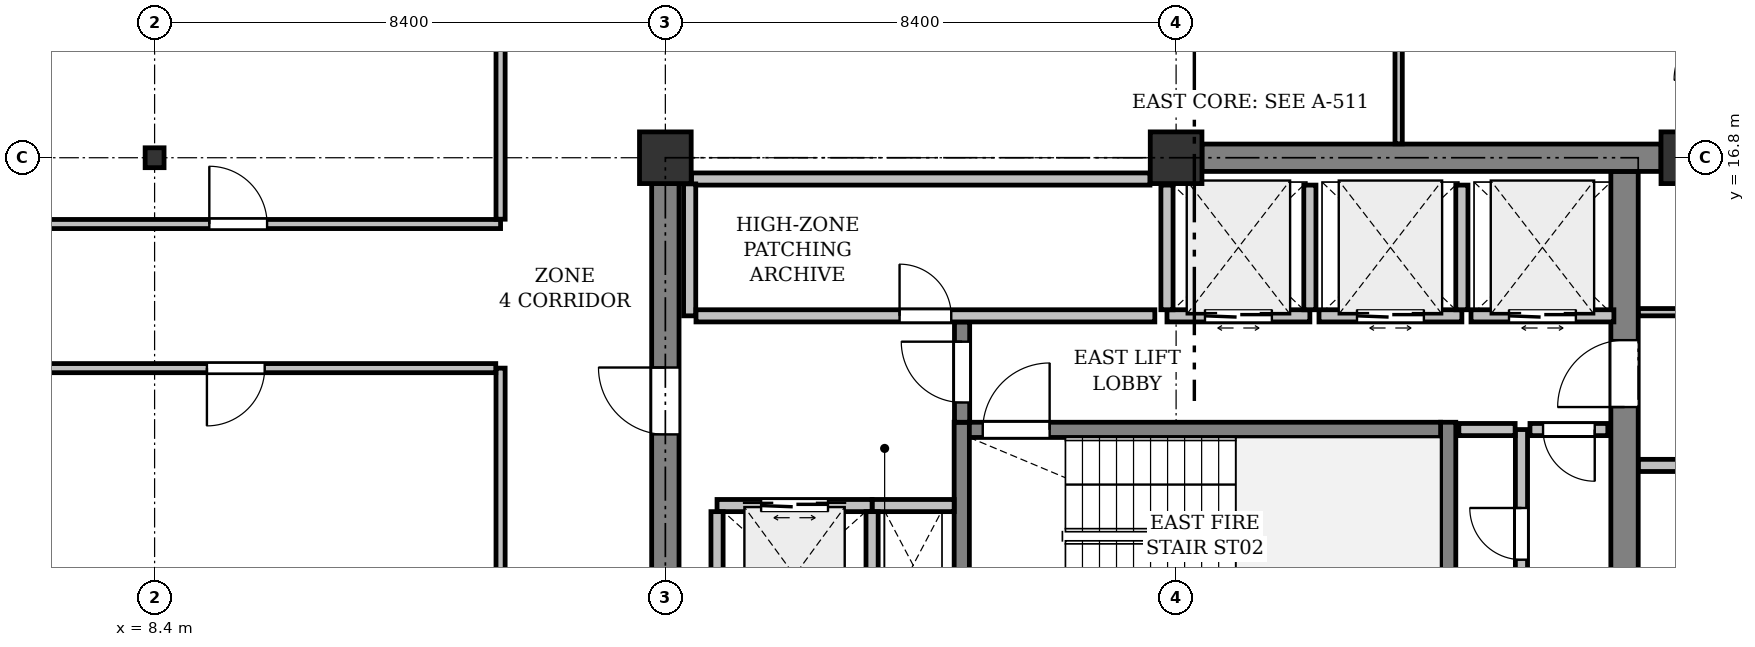
"""IFC4 building model, lengths in metres.
Left out: names, types, materials, properties, quantities, classifications, styles, units other than length and angle.
Written with IfcOpenShell. Run it as: python <this file> out.ifc"""

import sys

from ifc_helpers import new_model, si_unit, direction, frame, frame_2d, origin, origin_2d, place, context, subcontext, project, spatial, rectangle, i_section, extrude, element, fill, save


model = new_model("IFC4")
c1 = context("Model", 3, precision=1e-05, world=origin(), true_north=direction((0.0, 1.0)))
c2 = subcontext(c1, "Body", "Model", "MODEL_VIEW")
j1 = project(units=[si_unit("LENGTHUNIT", "METRE"), si_unit("PLANEANGLEUNIT", "RADIAN")], contexts=[c1])
p1 = place(None, origin())
s1 = spatial("IfcSite", under=j1, at=p1, CompositionType="ELEMENT")
p2 = place(p1, origin())
s2 = spatial("IfcBuilding", under=s1, at=p2, CompositionType="ELEMENT")
p3 = place(p2, frame((0.0, 0.0, 245.2)))
s3 = spatial("IfcBuildingStorey", under=s2, at=p3, CompositionType="ELEMENT", Elevation=245.2)
p4 = place(p3, frame((8.4, 16.8, 0.0), z_axis=(0.0, 0.0, 1.0), x_axis=(1.0, 0.0, 0.0)))
e1 = element("IfcColumn", 1, at=p4, inside=s3, PredefinedType="COLUMN", context=c2, shape_type="SweptSolid", body=[
    extrude(i_section(OverallWidth=0.35, OverallDepth=0.35, WebThickness=0.02, FlangeThickness=0.032, at=origin_2d()), origin(), (0.0, 0.0, 1.0), 5.0),
])
for number, where, z_axis, x_axis in (
    (2, (16.8, 16.8, 0.0), (0.0, 0.0, 1.0), (1.0, 0.0, 0.0)),
    (3, (25.2, 16.8, 0.0), (0.0, 0.0, 1.0), (1.0, 0.0, 0.0)),
    (4, (33.6, 16.8, 0.0), (0.0, 0.0, 1.0), (1.0, 0.0, 0.0)),
):
    element("IfcColumn", number, at=place(p3, frame(where, z_axis=z_axis, x_axis=x_axis)), inside=s3, PredefinedType="COLUMN", context=c2, shape_type="SweptSolid", body=[
        extrude(rectangle(XDim=1.0, YDim=1.0, at=origin_2d()), origin(), (0.0, 0.0, 1.0), 5.0),
    ])
p5 = place(p3, frame((32.575, 8.625, 0.0), z_axis=(0.0, 0.0, 1.0), x_axis=(0.0, 1.0, 0.0)))
e5 = element("IfcWall", 5, at=p5, inside=s3, PredefinedType="SHEAR", context=c2, shape_type="SweptSolid", body=[
    extrude(rectangle(XDim=7.95, YDim=0.45, at=frame_2d((3.975, 0.0))), origin(), (0.0, 0.0, 1.0), 4.725),
])
p6 = place(p5, frame((4.075, 0.0, 0.0)))
e6 = element("IfcOpeningElement", 6, at=p6, cuts=e5, PredefinedType="OPENING", context=c2, shape_type="SweptSolid", body=[
    extrude(rectangle(XDim=1.1, YDim=2.15, at=frame_2d((0.55, 1.075))), frame((0.0, 0.235, 0.0), z_axis=(0.0, -1.0, 0.0), x_axis=(1.0, 0.0, 0.0)), (0.0, 0.0, 1.0), 0.47),
])
p7 = place(p3, frame((16.8, 8.9, 0.0), z_axis=(0.0, 0.0, 1.0), x_axis=(0.0, 1.0, 0.0)))
e7 = element("IfcWall", 7, at=p7, inside=s3, PredefinedType="SHEAR", context=c2, shape_type="SweptSolid", body=[
    extrude(rectangle(XDim=7.4, YDim=0.45, at=frame_2d((3.7, 0.0))), origin(), (0.0, 0.0, 1.0), 4.725),
])
p8 = place(p7, frame((3.35, 0.0, 0.0)))
e8 = element("IfcOpeningElement", 8, at=p8, cuts=e7, PredefinedType="OPENING", context=c2, shape_type="SweptSolid", body=[
    extrude(rectangle(XDim=1.1, YDim=2.15, at=frame_2d((0.55, 1.075))), frame((0.0, 0.235, 0.0), z_axis=(0.0, -1.0, 0.0), x_axis=(1.0, 0.0, 0.0)), (0.0, 0.0, 1.0), 0.47),
])
p9 = place(p3, frame((25.7, 16.8, 0.0), z_axis=(0.0, 0.0, 1.0), x_axis=(1.0, 0.0, 0.0)))
e9 = element("IfcWall", 9, at=p9, inside=s3, PredefinedType="SHEAR", context=c2, shape_type="SweptSolid", body=[
    extrude(rectangle(XDim=7.4, YDim=0.45, at=frame_2d((3.7, 0.0))), origin(), (0.0, 0.0, 1.0), 4.725),
])
for number, where, z_axis, x_axis in (
    (10, (21.675, 8.7, 0.0), (0.0, 0.0, 1.0), (0.0, 1.0, 0.0)),
    (11, (29.675, 8.7, 0.0), (0.0, 0.0, 1.0), (0.0, 1.0, 0.0)),
):
    element("IfcWall", number, at=place(p3, frame(where, z_axis=z_axis, x_axis=x_axis)), inside=s3, PredefinedType="SHEAR", context=c2, shape_type="SweptSolid", body=[
        extrude(rectangle(XDim=3.75, YDim=0.25, at=frame_2d((1.875, 0.0))), origin(), (0.0, 0.0, 1.0), 4.725),
    ])
p10 = place(p3, frame((21.8, 12.325, 0.0), z_axis=(0.0, 0.0, 1.0), x_axis=(1.0, 0.0, 0.0)))
e12 = element("IfcWall", 12, at=p10, inside=s3, PredefinedType="SHEAR", context=c2, shape_type="SweptSolid", body=[
    extrude(rectangle(XDim=7.75, YDim=0.25, at=frame_2d((3.875, 0.0))), origin(), (0.0, 0.0, 1.0), 4.725),
])
p11 = place(p10, frame((0.22, 0.0, 0.0)))
e13 = element("IfcOpeningElement", 13, at=p11, cuts=e12, PredefinedType="OPENING", context=c2, shape_type="SweptSolid", body=[
    extrude(rectangle(XDim=1.1, YDim=2.15, at=frame_2d((0.55, 1.075))), frame((0.0, 0.135, 0.0), z_axis=(0.0, -1.0, 0.0), x_axis=(1.0, 0.0, 0.0)), (0.0, 0.0, 1.0), 0.27),
])
p12 = place(p3, frame((20.2, 11.08, 0.0), z_axis=(0.0, 0.0, 1.0), x_axis=(1.0, 0.0, 0.0)))
e14 = element("IfcWall", 14, at=p12, inside=s3, PredefinedType="PARTITIONING", context=c2, shape_type="SweptSolid", body=[
    extrude(rectangle(XDim=1.35, YDim=0.2, at=frame_2d((0.675, 0.0))), origin(), (0.0, 0.0, 1.0), 4.725),
])
p13 = place(p3, frame((21.68, 12.45, 0.0), z_axis=(0.0, 0.0, 1.0), x_axis=(0.0, 1.0, 0.0)))
e15 = element("IfcWall", 15, at=p13, inside=s3, PredefinedType="SHEAR", context=c2, shape_type="SweptSolid", body=[
    extrude(rectangle(XDim=1.65, YDim=0.25, at=frame_2d((0.825, 0.0))), origin(), (0.0, 0.0, 1.0), 4.725),
])
p14 = place(p13, frame((0.325, 0.0, 0.0)))
e16 = element("IfcOpeningElement", 16, at=p14, cuts=e15, PredefinedType="OPENING", context=c2, shape_type="SweptSolid", body=[
    extrude(rectangle(XDim=1.0, YDim=2.15, at=frame_2d((0.5, 1.075))), frame((0.0, 0.135, 0.0), z_axis=(0.0, -1.0, 0.0), x_axis=(1.0, 0.0, 0.0)), (0.0, 0.0, 1.0), 0.27),
])
p15 = place(p3, frame((17.65, 11.08, 0.0), z_axis=(0.0, 0.0, 1.0), x_axis=(1.0, 0.0, 0.0)))
e17 = element("IfcWall", 17, at=p15, inside=s3, PredefinedType="PARTITIONING", context=c2, shape_type="SweptSolid", body=[
    extrude(rectangle(XDim=2.55, YDim=0.2, at=frame_2d((1.275, 0.0))), origin(), (0.0, 0.0, 1.0), 4.725),
])
p16 = place(p15, frame((0.725, 0.0, 0.0)))
e18 = element("IfcOpeningElement", 18, at=p16, cuts=e17, PredefinedType="OPENING", context=c2, shape_type="SweptSolid", body=[
    extrude(rectangle(XDim=1.1, YDim=2.2, at=frame_2d((0.55, 1.1))), frame((0.0, 0.11, 0.0), z_axis=(0.0, -1.0, 0.0), x_axis=(1.0, 0.0, 0.0)), (0.0, 0.0, 1.0), 0.22),
])
for number, where, z_axis, x_axis in (
    (19, (20.2, 8.88, 0.0), (0.0, 0.0, 1.0), (0.0, 1.0, 0.0)),
    (20, (17.65, 8.88, 0.0), (0.0, 0.0, 1.0), (0.0, 1.0, 0.0)),
):
    element("IfcWall", number, at=place(p3, frame(where, z_axis=z_axis, x_axis=x_axis)), inside=s3, PredefinedType="PARTITIONING", context=c2, shape_type="SweptSolid", body=[
        extrude(rectangle(XDim=2.1, YDim=0.2, at=frame_2d((1.05, 0.0))), origin(), (0.0, 0.0, 1.0), 4.725),
    ])
p17 = place(p3, frame((25.05, 14.2, 0.0), z_axis=(0.0, 0.0, 1.0), x_axis=(1.0, 0.0, 0.0)))
e21 = element("IfcWall", 21, at=p17, inside=s3, PredefinedType="PARTITIONING", context=c2, shape_type="SweptSolid", body=[
    extrude(rectangle(XDim=2.35, YDim=0.2, at=frame_2d((1.175, 0.0))), origin(), (0.0, 0.0, 1.0), 4.725),
])
p18 = place(p17, frame((0.625, 0.0, 0.0)))
e22 = element("IfcOpeningElement", 22, at=p18, cuts=e21, PredefinedType="OPENING", context=c2, shape_type="SweptSolid", body=[
    extrude(rectangle(XDim=1.1, YDim=2.2, at=frame_2d((0.55, 1.1))), frame((0.0, 0.11, 0.0), z_axis=(0.0, -1.0, 0.0), x_axis=(1.0, 0.0, 0.0)), (0.0, 0.0, 1.0), 0.22),
])
for number, where, z_axis, x_axis in (
    (23, (27.4, 14.3, 0.0), (0.0, 0.0, 1.0), (0.0, 1.0, 0.0)),
    (24, (25.05, 14.3, 0.0), (0.0, 0.0, 1.0), (0.0, 1.0, 0.0)),
):
    element("IfcWall", number, at=place(p3, frame(where, z_axis=z_axis, x_axis=x_axis)), inside=s3, PredefinedType="PARTITIONING", context=c2, shape_type="SweptSolid", body=[
        extrude(rectangle(XDim=2.05, YDim=0.2, at=frame_2d((1.025, 0.0))), origin(), (0.0, 0.0, 1.0), 4.725),
    ])
p19 = place(p3, frame((27.55, 14.2, 0.0), z_axis=(0.0, 0.0, 1.0), x_axis=(1.0, 0.0, 0.0)))
e25 = element("IfcWall", 25, at=p19, inside=s3, PredefinedType="PARTITIONING", context=c2, shape_type="SweptSolid", body=[
    extrude(rectangle(XDim=2.35, YDim=0.2, at=frame_2d((1.175, 0.0))), origin(), (0.0, 0.0, 1.0), 4.725),
])
p20 = place(p19, frame((0.625, 0.0, 0.0)))
e26 = element("IfcOpeningElement", 26, at=p20, cuts=e25, PredefinedType="OPENING", context=c2, shape_type="SweptSolid", body=[
    extrude(rectangle(XDim=1.1, YDim=2.2, at=frame_2d((0.55, 1.1))), frame((0.0, 0.11, 0.0), z_axis=(0.0, -1.0, 0.0), x_axis=(1.0, 0.0, 0.0)), (0.0, 0.0, 1.0), 0.22),
])
p21 = place(p3, frame((29.9, 14.3, 0.0), z_axis=(0.0, 0.0, 1.0), x_axis=(0.0, 1.0, 0.0)))
e27 = element("IfcWall", 27, at=p21, inside=s3, PredefinedType="PARTITIONING", context=c2, shape_type="SweptSolid", body=[
    extrude(rectangle(XDim=2.05, YDim=0.2, at=frame_2d((1.025, 0.0))), origin(), (0.0, 0.0, 1.0), 4.725),
])
p22 = place(p3, frame((30.05, 14.2, 0.0), z_axis=(0.0, 0.0, 1.0), x_axis=(1.0, 0.0, 0.0)))
e28 = element("IfcWall", 28, at=p22, inside=s3, PredefinedType="PARTITIONING", context=c2, shape_type="SweptSolid", body=[
    extrude(rectangle(XDim=2.35, YDim=0.2, at=frame_2d((1.175, 0.0))), origin(), (0.0, 0.0, 1.0), 4.725),
])
p23 = place(p22, frame((0.625, 0.0, 0.0)))
e29 = element("IfcOpeningElement", 29, at=p23, cuts=e28, PredefinedType="OPENING", context=c2, shape_type="SweptSolid", body=[
    extrude(rectangle(XDim=1.1, YDim=2.2, at=frame_2d((0.55, 1.1))), frame((0.0, 0.11, 0.0), z_axis=(0.0, -1.0, 0.0), x_axis=(1.0, 0.0, 0.0)), (0.0, 0.0, 1.0), 0.22),
])
p24 = place(p3, frame((24.695, 16.45, 0.0), z_axis=(0.0, 0.0, 1.0), x_axis=(-1.0, 0.0, 0.0)))
e30 = element("IfcWall", 30, at=p24, inside=s3, PredefinedType="PARTITIONING", context=c2, shape_type="SweptSolid", body=[
    extrude(rectangle(XDim=7.39, YDim=0.2, at=frame_2d((3.695, 0.0))), origin(), (0.0, 0.0, 1.0), 4.725),
])
p25 = place(p3, frame((17.2, 16.295, 0.0), z_axis=(0.0, 0.0, 1.0), x_axis=(0.0, -1.0, 0.0)))
e31 = element("IfcWall", 31, at=p25, inside=s3, PredefinedType="PARTITIONING", context=c2, shape_type="SweptSolid", body=[
    extrude(rectangle(XDim=2.095, YDim=0.2, at=frame_2d((1.047, 0.0))), origin(), (0.0, 0.0, 1.0), 4.725),
])
p26 = place(p3, frame((17.304, 14.2, 0.0), z_axis=(0.0, 0.0, 1.0), x_axis=(1.0, 0.0, 0.0)))
e32 = element("IfcWall", 32, at=p26, inside=s3, PredefinedType="PARTITIONING", context=c2, shape_type="SweptSolid", body=[
    extrude(rectangle(XDim=7.546, YDim=0.2, at=frame_2d((3.773, 0.0))), origin(), (0.0, 0.0, 1.0), 4.725),
])
p27 = place(p26, frame((3.348, 0.0, 0.0)))
e33 = element("IfcOpeningElement", 33, at=p27, cuts=e32, PredefinedType="OPENING", context=c2, shape_type="SweptSolid", body=[
    extrude(rectangle(XDim=0.85, YDim=2.15, at=frame_2d((0.425, 1.075))), frame((0.0, 0.11, 0.0), z_axis=(0.0, -1.0, 0.0), x_axis=(1.0, 0.0, 0.0)), (0.0, 0.0, 1.0), 0.22),
])
p28 = place(p3, frame((32.3, 12.33, 0.0), z_axis=(0.0, 0.0, 1.0), x_axis=(-1.0, 0.0, 0.0)))
e34 = element("IfcWall", 34, at=p28, inside=s3, PredefinedType="PARTITIONING", context=c2, shape_type="SweptSolid", body=[
    extrude(rectangle(XDim=2.45, YDim=0.2, at=frame_2d((1.225, 0.0))), origin(), (0.0, 0.0, 1.0), 4.725),
])
p29 = place(p28, frame((0.8, 0.0, 0.0)))
e35 = element("IfcOpeningElement", 35, at=p29, cuts=e34, PredefinedType="OPENING", context=c2, shape_type="SweptSolid", body=[
    extrude(rectangle(XDim=0.85, YDim=2.15, at=frame_2d((0.425, 1.075))), frame((0.0, 0.11, 0.0), z_axis=(0.0, -1.0, 0.0), x_axis=(1.0, 0.0, 0.0)), (0.0, 0.0, 1.0), 0.22),
])
p30 = place(p3, frame((14.09, 11.052, 0.0), z_axis=(0.0, 0.0, 1.0), x_axis=(-1.0, 0.0, 0.0)))
e36 = element("IfcWall", 36, at=p30, inside=s3, PredefinedType="PARTITIONING", context=c2, shape_type="SweptSolid", body=[
    extrude(rectangle(XDim=6.38, YDim=0.2, at=frame_2d((3.19, 0.0))), origin(), (0.0, 0.0, 1.0), 3.709),
])
p31 = place(p3, frame((7.71, 10.948, 0.0), z_axis=(0.0, 0.0, 1.0), x_axis=(0.0, -1.0, 0.0)))
e37 = element("IfcWall", 37, at=p31, inside=s3, PredefinedType="PARTITIONING", context=c2, shape_type="SweptSolid", body=[
    extrude(rectangle(XDim=3.238, YDim=0.2, at=frame_2d((1.619, 0.0))), origin(), (0.0, 0.0, 1.0), 3.825),
])
p32 = place(p3, frame((14.09, 7.814, 0.0), z_axis=(0.0, 0.0, 1.0), x_axis=(0.0, 1.0, 0.0)))
e38 = element("IfcWall", 38, at=p32, inside=s3, PredefinedType="PARTITIONING", context=c2, shape_type="SweptSolid", body=[
    extrude(rectangle(XDim=3.134, YDim=0.2, at=frame_2d((1.567, 0.0))), origin(), (0.0, 0.0, 1.0), 3.825),
])
p33 = place(p3, frame((14.09, 14.296, 0.0), z_axis=(0.0, 0.0, 1.0), x_axis=(-1.0, 0.0, 0.0)))
e39 = element("IfcWall", 39, at=p33, inside=s3, PredefinedType="PARTITIONING", context=c2, shape_type="SweptSolid", body=[
    extrude(rectangle(XDim=6.38, YDim=0.2, at=frame_2d((3.19, 0.0))), origin(), (0.0, 0.0, 1.0), 3.709),
])
p34 = place(p3, frame((7.71, 14.192, 0.0), z_axis=(0.0, 0.0, 1.0), x_axis=(0.0, -1.0, 0.0)))
e40 = element("IfcWall", 40, at=p34, inside=s3, PredefinedType="PARTITIONING", context=c2, shape_type="SweptSolid", body=[
    extrude(rectangle(XDim=3.036, YDim=0.2, at=frame_2d((1.518, 0.0))), origin(), (0.0, 0.0, 1.0), 4.725),
])
p35 = place(p34, frame((1.018, 0.0, 0.0)))
e41 = element("IfcOpeningElement", 41, at=p35, cuts=e40, PredefinedType="OPENING", context=c2, shape_type="SweptSolid", body=[
    extrude(rectangle(XDim=1.0, YDim=2.15, at=frame_2d((0.5, 1.075))), frame((0.0, 0.11, 0.0), z_axis=(0.0, -1.0, 0.0), x_axis=(1.0, 0.0, 0.0)), (0.0, 0.0, 1.0), 0.22),
])
p36 = place(p3, frame((14.09, 11.156, 0.0), z_axis=(0.0, 0.0, 1.0), x_axis=(0.0, 1.0, 0.0)))
e42 = element("IfcWall", 42, at=p36, inside=s3, PredefinedType="PARTITIONING", context=c2, shape_type="SweptSolid", body=[
    extrude(rectangle(XDim=3.036, YDim=0.2, at=frame_2d((1.518, 0.0))), origin(), (0.0, 0.0, 1.0), 4.725),
])
p37 = place(p3, frame((14.09, 17.54, 0.0), z_axis=(0.0, 0.0, 1.0), x_axis=(-1.0, 0.0, 0.0)))
e43 = element("IfcWall", 43, at=p37, inside=s3, PredefinedType="PARTITIONING", context=c2, shape_type="SweptSolid", body=[
    extrude(rectangle(XDim=6.38, YDim=0.2, at=frame_2d((3.19, 0.0))), origin(), (0.0, 0.0, 1.0), 3.709),
])
p38 = place(p37, frame((2.69, 0.0, 0.0)))
e44 = element("IfcOpeningElement", 44, at=p38, cuts=e43, PredefinedType="OPENING", context=c2, shape_type="SweptSolid", body=[
    extrude(rectangle(XDim=1.0, YDim=2.15, at=frame_2d((0.5, 1.075))), frame((0.0, 0.11, 0.0), z_axis=(0.0, -1.0, 0.0), x_axis=(1.0, 0.0, 0.0)), (0.0, 0.0, 1.0), 0.22),
])
for number, where, z_axis, x_axis in (
    (45, (7.71, 17.436, 0.0), (0.0, 0.0, 1.0), (0.0, -1.0, 0.0)),
    (46, (14.09, 14.4, 0.0), (0.0, 0.0, 1.0), (0.0, 1.0, 0.0)),
):
    element("IfcWall", number, at=place(p3, frame(where, z_axis=z_axis, x_axis=x_axis)), inside=s3, PredefinedType="PARTITIONING", context=c2, shape_type="SweptSolid", body=[
        extrude(rectangle(XDim=3.036, YDim=0.2, at=frame_2d((1.518, 0.0))), origin(), (0.0, 0.0, 1.0), 3.825),
    ])
p39 = place(p6, origin())
e47 = element("IfcDoor", 47, at=p39, inside=s3, OperationType="SINGLE_SWING_RIGHT", PredefinedType="DOOR", context=c2, shape_type="SweptSolid", body=[
    extrude(rectangle(XDim=1.1, YDim=2.15, at=frame_2d((0.55, 1.075))), frame((0.0, 0.025, 0.0), z_axis=(0.0, -1.0, 0.0), x_axis=(1.0, 0.0, 0.0)), (0.0, 0.0, 1.0), 0.05),
])
fill(e6, e47)
p40 = place(p8, origin())
e48 = element("IfcDoor", 48, at=p40, inside=s3, OperationType="SINGLE_SWING_LEFT", PredefinedType="DOOR", context=c2, shape_type="SweptSolid", body=[
    extrude(rectangle(XDim=1.1, YDim=2.15, at=frame_2d((0.55, 1.075))), frame((0.0, 0.025, 0.0), z_axis=(0.0, -1.0, 0.0), x_axis=(1.0, 0.0, 0.0)), (0.0, 0.0, 1.0), 0.05),
])
fill(e8, e48)
p41 = place(p11, origin())
e49 = element("IfcDoor", 49, at=p41, inside=s3, OperationType="SINGLE_SWING_LEFT", PredefinedType="DOOR", context=c2, shape_type="SweptSolid", body=[
    extrude(rectangle(XDim=1.1, YDim=2.15, at=frame_2d((0.55, 1.075))), frame((0.0, 0.025, 0.0), z_axis=(0.0, -1.0, 0.0), x_axis=(1.0, 0.0, 0.0)), (0.0, 0.0, 1.0), 0.05),
])
fill(e13, e49)
p42 = place(p14, origin())
e50 = element("IfcDoor", 50, at=p42, inside=s3, OperationType="SINGLE_SWING_LEFT", PredefinedType="DOOR", context=c2, shape_type="SweptSolid", body=[
    extrude(rectangle(XDim=1.0, YDim=2.15, at=frame_2d((0.5, 1.075))), frame((0.0, 0.025, 0.0), z_axis=(0.0, -1.0, 0.0), x_axis=(1.0, 0.0, 0.0)), (0.0, 0.0, 1.0), 0.05),
])
fill(e16, e50)
p43 = place(p16, origin())
e51 = element("IfcDoor", 51, at=p43, inside=s3, OperationType="DOUBLE_DOOR_SLIDING", PredefinedType="DOOR", context=c2, shape_type="SweptSolid", body=[
    extrude(rectangle(XDim=1.1, YDim=2.2, at=frame_2d((0.55, 1.1))), frame((0.0, 0.025, 0.0), z_axis=(0.0, -1.0, 0.0), x_axis=(1.0, 0.0, 0.0)), (0.0, 0.0, 1.0), 0.05),
])
fill(e18, e51)
p44 = place(p18, origin())
e52 = element("IfcDoor", 52, at=p44, inside=s3, OperationType="DOUBLE_DOOR_SLIDING", PredefinedType="DOOR", context=c2, shape_type="SweptSolid", body=[
    extrude(rectangle(XDim=1.1, YDim=2.2, at=frame_2d((0.55, 1.1))), frame((0.0, 0.025, 0.0), z_axis=(0.0, -1.0, 0.0), x_axis=(1.0, 0.0, 0.0)), (0.0, 0.0, 1.0), 0.05),
])
fill(e22, e52)
p45 = place(p20, origin())
e53 = element("IfcDoor", 53, at=p45, inside=s3, OperationType="DOUBLE_DOOR_SLIDING", PredefinedType="DOOR", context=c2, shape_type="SweptSolid", body=[
    extrude(rectangle(XDim=1.1, YDim=2.2, at=frame_2d((0.55, 1.1))), frame((0.0, 0.025, 0.0), z_axis=(0.0, -1.0, 0.0), x_axis=(1.0, 0.0, 0.0)), (0.0, 0.0, 1.0), 0.05),
])
fill(e26, e53)
p46 = place(p23, origin())
e54 = element("IfcDoor", 54, at=p46, inside=s3, OperationType="DOUBLE_DOOR_SLIDING", PredefinedType="DOOR", context=c2, shape_type="SweptSolid", body=[
    extrude(rectangle(XDim=1.1, YDim=2.2, at=frame_2d((0.55, 1.1))), frame((0.0, 0.025, 0.0), z_axis=(0.0, -1.0, 0.0), x_axis=(1.0, 0.0, 0.0)), (0.0, 0.0, 1.0), 0.05),
])
fill(e29, e54)
p47 = place(p27, origin())
e55 = element("IfcDoor", 55, at=p47, inside=s3, OperationType="SINGLE_SWING_RIGHT", PredefinedType="DOOR", context=c2, shape_type="SweptSolid", body=[
    extrude(rectangle(XDim=0.85, YDim=2.15, at=frame_2d((0.425, 1.075))), frame((0.0, 0.025, 0.0), z_axis=(0.0, -1.0, 0.0), x_axis=(1.0, 0.0, 0.0)), (0.0, 0.0, 1.0), 0.05),
])
fill(e33, e55)
p48 = place(p29, origin())
e56 = element("IfcDoor", 56, at=p48, inside=s3, OperationType="SINGLE_SWING_LEFT", PredefinedType="DOOR", context=c2, shape_type="SweptSolid", body=[
    extrude(rectangle(XDim=0.85, YDim=2.15, at=frame_2d((0.425, 1.075))), frame((0.0, 0.025, 0.0), z_axis=(0.0, -1.0, 0.0), x_axis=(1.0, 0.0, 0.0)), (0.0, 0.0, 1.0), 0.05),
])
fill(e35, e56)
p49 = place(p35, origin())
e57 = element("IfcDoor", 57, at=p49, inside=s3, OperationType="SINGLE_SWING_LEFT", PredefinedType="DOOR", context=c2, shape_type="SweptSolid", body=[
    extrude(rectangle(XDim=1.0, YDim=2.15, at=frame_2d((0.5, 1.075))), frame((0.0, 0.025, 0.0), z_axis=(0.0, -1.0, 0.0), x_axis=(1.0, 0.0, 0.0)), (0.0, 0.0, 1.0), 0.05),
])
fill(e41, e57)
p50 = place(p38, origin())
e58 = element("IfcDoor", 58, at=p50, inside=s3, OperationType="SINGLE_SWING_RIGHT", PredefinedType="DOOR", context=c2, shape_type="SweptSolid", body=[
    extrude(rectangle(XDim=1.0, YDim=2.15, at=frame_2d((0.5, 1.075))), frame((0.0, 0.025, 0.0), z_axis=(0.0, -1.0, 0.0), x_axis=(1.0, 0.0, 0.0)), (0.0, 0.0, 1.0), 0.05),
])
fill(e44, e58)
save(model, sys.argv[1])
